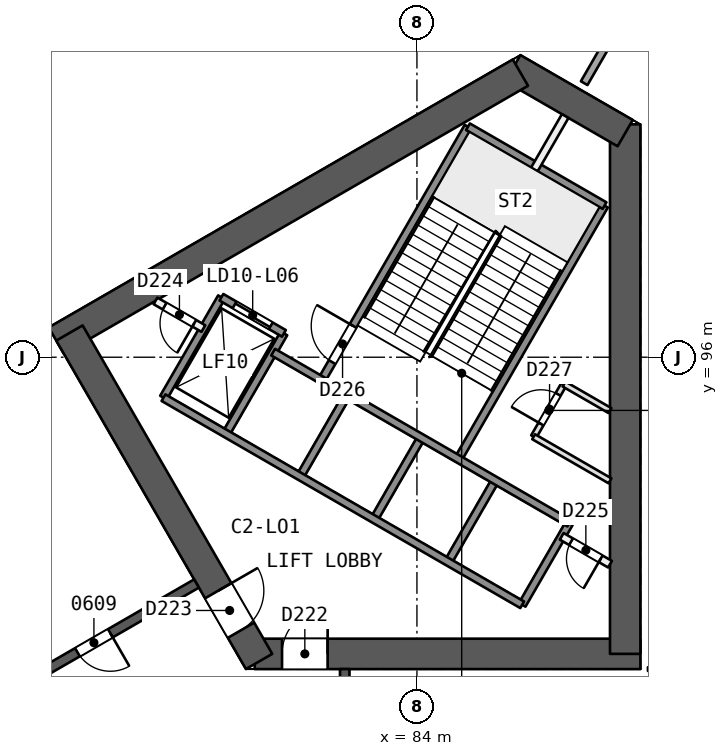
"""IFC4 building model, lengths in metres.
Left out: names, types, materials, properties, quantities, classifications, styles, units other than length and angle.
Written with IfcOpenShell. Run it as: python <this file> out.ifc"""

import sys

from ifc_helpers import new_model, si_unit, direction, frame, frame_2d, origin, place, context, subcontext, project, spatial, rectangle, extrude, element, fill, save


model = new_model("IFC4")
c1 = context("Model", 3, precision=1e-05, world=origin(), true_north=direction((0.0, 1.0)))
c2 = subcontext(c1, "Body", "Model", "MODEL_VIEW")
j1 = project(units=[si_unit("LENGTHUNIT", "METRE"), si_unit("PLANEANGLEUNIT", "RADIAN")], contexts=[c1])
p1 = place(None, origin())
s1 = spatial("IfcSite", under=j1, at=p1, CompositionType="ELEMENT")
p2 = place(p1, origin())
s2 = spatial("IfcBuilding", under=s1, at=p2, CompositionType="ELEMENT")
p3 = place(p2, frame((0.0, 0.0, 33.7)))
s3 = spatial("IfcBuildingStorey", under=s2, at=p3, CompositionType="ELEMENT", Elevation=33.7)
p4 = place(p3, frame((79.731, 88.194, 0.0), z_axis=(0.0, 0.0, 1.0), x_axis=(1.0, 0.0, 0.0)))
e1 = element("IfcWall", 1, at=p4, inside=s3, PredefinedType="SHEAR", context=c2, shape_type="SweptSolid", body=[
    extrude(rectangle(XDim=10.149, YDim=0.8, at=frame_2d((5.074, 0.0))), origin(), (0.0, 0.0, 1.0), 3.7),
])
p5 = place(p4, frame((0.719, 0.0, 0.0)))
e2 = element("IfcOpeningElement", 2, at=p5, cuts=e1, PredefinedType="OPENING", context=c2, shape_type="SweptSolid", body=[
    extrude(rectangle(XDim=1.2, YDim=2.1, at=frame_2d((0.6, 1.05))), frame((0.0, 0.411, 0.0), z_axis=(0.0, -1.0, 0.0), x_axis=(1.0, 0.0, 0.0)), (0.0, 0.0, 1.0), 0.821),
])
p6 = place(p3, frame((89.48, 88.194, 0.0), z_axis=(0.0, 0.0, 1.0), x_axis=(0.0, 1.0, 0.0)))
e3 = element("IfcWall", 3, at=p6, inside=s3, PredefinedType="SHEAR", context=c2, shape_type="SweptSolid", body=[
    extrude(rectangle(XDim=13.933, YDim=0.8, at=frame_2d((6.967, 0.0))), origin(), (0.0, 0.0, 1.0), 3.7),
])
p7 = place(p3, frame((89.48, 101.897, 0.0), z_axis=(0.0, 0.0, 1.0), x_axis=(-0.866034355626, 0.499984494636, 0.0)))
e4 = element("IfcWall", 4, at=p7, inside=s3, PredefinedType="SHEAR", context=c2, shape_type="SweptSolid", body=[
    extrude(rectangle(XDim=3.414, YDim=0.8, at=frame_2d((1.707, 0.0))), origin(), (0.0, 0.0, 1.0), 3.7),
])
p8 = place(p3, frame((86.723, 103.488, 0.0), z_axis=(0.0, 0.0, 1.0), x_axis=(-0.866032504327, -0.499987701298, 0.0)))
e5 = element("IfcWall", 5, at=p8, inside=s3, PredefinedType="SHEAR", context=c2, shape_type="SweptSolid", body=[
    extrude(rectangle(XDim=14.102, YDim=0.8, at=frame_2d((7.051, 0.0))), origin(), (0.0, 0.0, 1.0), 3.7),
])
p9 = place(p3, frame((74.856, 96.637, 0.0), z_axis=(0.0, 0.0, 1.0), x_axis=(0.499993500917, -0.866029155999, 0.0)))
e6 = element("IfcWall", 6, at=p9, inside=s3, PredefinedType="SHEAR", context=c2, shape_type="SweptSolid", body=[
    extrude(rectangle(XDim=9.98, YDim=0.8, at=frame_2d((4.99, 0.0))), origin(), (0.0, 0.0, 1.0), 3.7),
])
p10 = place(p9, frame((7.83, 0.0, 0.0)))
e7 = element("IfcOpeningElement", 7, at=p10, cuts=e6, PredefinedType="OPENING", context=c2, shape_type="SweptSolid", body=[
    extrude(rectangle(XDim=1.2, YDim=2.1, at=frame_2d((0.6, 1.05))), frame((0.0, 0.411, 0.0), z_axis=(0.0, -1.0, 0.0), x_axis=(1.0, 0.0, 0.0)), (0.0, 0.0, 1.0), 0.821),
])
p11 = place(p3, frame((82.1, 72.206, 0.0), z_axis=(0.0, 0.0, 1.0), x_axis=(0.0, 1.0, 0.0)))
e8 = element("IfcWall", 8, at=p11, inside=s3, PredefinedType="SHEAR", context=c2, shape_type="SweptSolid", body=[
    extrude(rectangle(XDim=15.588, YDim=0.25, at=frame_2d((7.794, 0.0))), origin(), (0.0, 0.0, 1.0), 3.2),
])
p12 = place(p11, frame((2.462, 0.0, 0.0)))
e9 = element("IfcOpeningElement", 9, at=p12, cuts=e8, PredefinedType="OPENING", context=c2, shape_type="SweptSolid", body=[
    extrude(rectangle(XDim=1.0, YDim=2.1, at=frame_2d((0.5, 1.05))), frame((0.0, 0.135, 0.0), z_axis=(0.0, -1.0, 0.0), x_axis=(1.0, 0.0, 0.0)), (0.0, 0.0, 1.0), 0.271),
])
p13 = place(p11, frame((8.315, 0.0, 0.0)))
e10 = element("IfcOpeningElement", 10, at=p13, cuts=e8, PredefinedType="OPENING", context=c2, shape_type="SweptSolid", body=[
    extrude(rectangle(XDim=1.1, YDim=2.1, at=frame_2d((0.55, 1.05))), frame((0.0, 0.135, 0.0), z_axis=(0.0, -1.0, 0.0), x_axis=(1.0, 0.0, 0.0)), (0.0, 0.0, 1.0), 0.271),
])
p14 = place(p11, frame((12.127, 0.0, 0.0)))
e11 = element("IfcOpeningElement", 11, at=p14, cuts=e8, PredefinedType="OPENING", context=c2, shape_type="SweptSolid", body=[
    extrude(rectangle(XDim=1.0, YDim=2.1, at=frame_2d((0.5, 1.05))), frame((0.0, 0.135, 0.0), z_axis=(0.0, -1.0, 0.0), x_axis=(1.0, 0.0, 0.0)), (0.0, 0.0, 1.0), 0.271),
])
p15 = place(p3, frame((78.2, 90.046, 0.0), z_axis=(0.0, 0.0, 1.0), x_axis=(-0.866026492143, -0.499998114903, 0.0)))
e12 = element("IfcWall", 12, at=p15, inside=s3, PredefinedType="SHEAR", context=c2, shape_type="SweptSolid", body=[
    extrude(rectangle(XDim=15.588, YDim=0.25, at=frame_2d((7.794, 0.0))), origin(), (0.0, 0.0, 1.0), 3.2),
])
p16 = place(p15, frame((2.618, 0.0, 0.0)))
e13 = element("IfcOpeningElement", 13, at=p16, cuts=e12, PredefinedType="OPENING", context=c2, shape_type="SweptSolid", body=[
    extrude(rectangle(XDim=1.0, YDim=2.1, at=frame_2d((0.5, 1.05))), frame((0.0, 0.135, 0.0), z_axis=(0.0, -1.0, 0.0), x_axis=(1.0, 0.0, 0.0)), (0.0, 0.0, 1.0), 0.271),
])
p17 = place(p15, frame((9.218, 0.0, 0.0)))
e14 = element("IfcOpeningElement", 14, at=p17, cuts=e12, PredefinedType="OPENING", context=c2, shape_type="SweptSolid", body=[
    extrude(rectangle(XDim=1.0, YDim=2.1, at=frame_2d((0.5, 1.05))), frame((0.0, 0.135, 0.0), z_axis=(0.0, -1.0, 0.0), x_axis=(1.0, 0.0, 0.0)), (0.0, 0.0, 1.0), 0.271),
])
p18 = place(p15, frame((12.594, 0.0, 0.0)))
e15 = element("IfcOpeningElement", 15, at=p18, cuts=e12, PredefinedType="OPENING", context=c2, shape_type="SweptSolid", body=[
    extrude(rectangle(XDim=1.0, YDim=2.1, at=frame_2d((0.5, 1.05))), frame((0.0, 0.135, 0.0), z_axis=(0.0, -1.0, 0.0), x_axis=(1.0, 0.0, 0.0)), (0.0, 0.0, 1.0), 0.271),
])
p19 = place(p3, frame((96.276, 87.794, 0.0), z_axis=(0.0, 0.0, 1.0), x_axis=(-1.0, 0.0, 0.0)))
e16 = element("IfcWall", 16, at=p19, inside=s3, PredefinedType="PARTITIONING", context=c2, shape_type="SweptSolid", body=[
    extrude(rectangle(XDim=6.197, YDim=0.1, at=frame_2d((3.099, 0.0))), origin(), (0.0, 0.0, 1.0), 3.2),
])
p20 = place(p19, frame((2.649, 0.0, 0.0)))
e17 = element("IfcOpeningElement", 17, at=p20, cuts=e16, PredefinedType="OPENING", context=c2, shape_type="SweptSolid", body=[
    extrude(rectangle(XDim=0.9, YDim=2.1, at=frame_2d((0.45, 1.05))), frame((0.0, 0.061, 0.0), z_axis=(0.0, -1.0, 0.0), x_axis=(1.0, 0.0, 0.0)), (0.0, 0.0, 1.0), 0.121),
])
p21 = place(p3, frame((93.621, 112.252, 0.0), z_axis=(0.0, 0.0, 1.0), x_axis=(-0.499992367345, -0.866029810455, 0.0)))
e18 = element("IfcWall", 18, at=p21, inside=s3, PredefinedType="PARTITIONING", context=c2, shape_type="SweptSolid", body=[
    extrude(rectangle(XDim=10.44, YDim=0.2, at=frame_2d((5.22, 0.0))), origin(), (0.0, 0.0, 1.0), 3.2),
])
p22 = place(p3, frame((37.61, 83.152, 0.0), z_axis=(0.0, 0.0, 1.0), x_axis=(0.866024438126, 0.500001672566, 0.0)))
e19 = element("IfcWall", 19, at=p22, inside=s3, PredefinedType="SOLIDWALL", context=c2, shape_type="SweptSolid", body=[
    extrude(rectangle(XDim=61.61, YDim=0.3, at=frame_2d((30.805, 0.0))), origin(), (0.0, 0.0, 1.0), 3.2),
])
p23 = place(p22, frame((34.281, 0.0, 0.0)))
e20 = element("IfcOpeningElement", 20, at=p23, cuts=e19, PredefinedType="OPENING", context=c2, shape_type="SweptSolid", body=[
    extrude(rectangle(XDim=2.4, YDim=2.4, at=frame_2d((1.2, 1.2))), frame((0.0, 0.161, 0.0), z_axis=(0.0, -1.0, 0.0), x_axis=(1.0, 0.0, 0.0)), (0.0, 0.0, 1.0), 0.321),
])
p24 = place(p22, frame((47.767, 0.0, 0.0)))
e21 = element("IfcOpeningElement", 21, at=p24, cuts=e19, PredefinedType="OPENING", context=c2, shape_type="SweptSolid", body=[
    extrude(rectangle(XDim=2.4, YDim=2.4, at=frame_2d((1.2, 1.2))), frame((0.0, 0.161, 0.0), z_axis=(0.0, -1.0, 0.0), x_axis=(1.0, 0.0, 0.0)), (0.0, 0.0, 1.0), 0.321),
])
p25 = place(p22, frame((24.305, 0.0, 0.0)))
e22 = element("IfcOpeningElement", 22, at=p25, cuts=e19, PredefinedType="OPENING", context=c2, shape_type="SweptSolid", body=[
    extrude(rectangle(XDim=2.4, YDim=2.4, at=frame_2d((1.2, 1.2))), frame((0.0, 0.161, 0.0), z_axis=(0.0, -1.0, 0.0), x_axis=(1.0, 0.0, 0.0)), (0.0, 0.0, 1.0), 0.321),
])
p26 = place(p22, frame((11.402, 0.0, 0.0)))
e23 = element("IfcOpeningElement", 23, at=p26, cuts=e19, PredefinedType="OPENING", context=c2, shape_type="SweptSolid", body=[
    extrude(rectangle(XDim=2.4, YDim=2.4, at=frame_2d((1.2, 1.2))), frame((0.0, 0.161, 0.0), z_axis=(0.0, -1.0, 0.0), x_axis=(1.0, 0.0, 0.0)), (0.0, 0.0, 1.0), 0.321),
])
p27 = place(p22, frame((28.981, 0.0, 0.0)))
e24 = element("IfcOpeningElement", 24, at=p27, cuts=e19, PredefinedType="OPENING", context=c2, shape_type="SweptSolid", body=[
    extrude(rectangle(XDim=2.4, YDim=2.4, at=frame_2d((1.2, 1.2))), frame((0.0, 0.161, 0.0), z_axis=(0.0, -1.0, 0.0), x_axis=(1.0, 0.0, 0.0)), (0.0, 0.0, 1.0), 0.321),
])
p28 = place(p3, frame((86.77, 89.486, 0.0), z_axis=(0.0, 0.0, 1.0), x_axis=(0.499961042966, 0.86604789447, 0.0)))
e25 = element("IfcWall", 25, at=p28, inside=s3, PredefinedType="SOLIDWALL", context=c2, shape_type="SweptSolid", body=[
    extrude(rectangle(XDim=2.48, YDim=0.2, at=frame_2d((1.24, 0.0))), origin(), (0.0, 0.0, 1.0), 3.2),
])
p29 = place(p3, frame((87.071, 93.908, 0.0), z_axis=(0.0, 0.0, 1.0), x_axis=(0.499995408039, 0.866028054938, 0.0)))
e26 = element("IfcWall", 26, at=p29, inside=s3, PredefinedType="PARTITIONING", context=c2, shape_type="SweptSolid", body=[
    extrude(rectangle(XDim=1.6, YDim=0.15, at=frame_2d((0.8, 0.0))), origin(), (0.0, 0.0, 1.0), 3.2),
])
p30 = place(p29, frame((0.387, 0.0, 0.0)))
e27 = element("IfcOpeningElement", 27, at=p30, cuts=e26, PredefinedType="OPENING", context=c2, shape_type="SweptSolid", body=[
    extrude(rectangle(XDim=0.9, YDim=2.1, at=frame_2d((0.45, 1.05))), frame((0.0, 0.085, 0.0), z_axis=(0.0, -1.0, 0.0), x_axis=(1.0, 0.0, 0.0)), (0.0, 0.0, 1.0), 0.171),
])
p31 = place(p3, frame((84.821, 90.611, 0.0), z_axis=(0.0, 0.0, 1.0), x_axis=(0.499961042966, 0.86604789447, 0.0)))
e28 = element("IfcWall", 28, at=p31, inside=s3, PredefinedType="SOLIDWALL", context=c2, shape_type="SweptSolid", body=[
    extrude(rectangle(XDim=2.48, YDim=0.2, at=frame_2d((1.24, 0.0))), origin(), (0.0, 0.0, 1.0), 3.2),
])
p32 = place(p3, frame((85.087, 93.321, 0.0), z_axis=(0.0, 0.0, 1.0), x_axis=(0.500019787375, 0.866013979237, 0.0)))
e29 = element("IfcWall", 29, at=p32, inside=s3, PredefinedType="SOLIDWALL", context=c2, shape_type="SweptSolid", body=[
    extrude(rectangle(XDim=7.7, YDim=0.2, at=frame_2d((3.85, 0.0))), origin(), (0.0, 0.0, 1.0), 3.2),
])
p33 = place(p3, frame((82.873, 91.736, 0.0), z_axis=(0.0, 0.0, 1.0), x_axis=(0.499961042966, 0.86604789447, 0.0)))
e30 = element("IfcWall", 30, at=p33, inside=s3, PredefinedType="SOLIDWALL", context=c2, shape_type="SweptSolid", body=[
    extrude(rectangle(XDim=2.48, YDim=0.2, at=frame_2d((1.24, 0.0))), origin(), (0.0, 0.0, 1.0), 3.2),
])
p34 = place(p3, frame((87.09, 100.94, 0.0), z_axis=(0.0, 0.0, 1.0), x_axis=(0.499956811548, 0.866050337213, 0.0)))
e31 = element("IfcWall", 31, at=p34, inside=s3, PredefinedType="PARTITIONING", context=c2, shape_type="SweptSolid", body=[
    extrude(rectangle(XDim=1.623, YDim=0.2, at=frame_2d((0.812, 0.0))), origin(), (0.0, 0.0, 1.0), 3.2),
])
p35 = place(p3, frame((80.924, 92.861, 0.0), z_axis=(0.0, 0.0, 1.0), x_axis=(0.499961042966, 0.86604789447, 0.0)))
e32 = element("IfcWall", 32, at=p35, inside=s3, PredefinedType="SOLIDWALL", context=c2, shape_type="SweptSolid", body=[
    extrude(rectangle(XDim=2.48, YDim=0.2, at=frame_2d((1.24, 0.0))), origin(), (0.0, 0.0, 1.0), 3.2),
])
p36 = place(p3, frame((81.493, 95.396, 0.0), z_axis=(0.0, 0.0, 1.0), x_axis=(0.500006057782, 0.866021906294, 0.0)))
e33 = element("IfcWall", 33, at=p36, inside=s3, PredefinedType="SOLIDWALL", context=c2, shape_type="SweptSolid", body=[
    extrude(rectangle(XDim=7.7, YDim=0.2, at=frame_2d((3.85, 0.0))), origin(), (0.0, 0.0, 1.0), 3.2),
])
p37 = place(p36, frame((0.55, 0.0, 0.0)))
e34 = element("IfcOpeningElement", 34, at=p37, cuts=e33, PredefinedType="OPENING", context=c2, shape_type="SweptSolid", body=[
    extrude(rectangle(XDim=1.1, YDim=2.1, at=frame_2d((0.55, 1.05))), frame((0.0, 0.11, 0.0), z_axis=(0.0, -1.0, 0.0), x_axis=(1.0, 0.0, 0.0)), (0.0, 0.0, 1.0), 0.221),
])
for number, where, z_axis, x_axis in (
    (35, (78.976, 93.986, 0.0), (0.0, 0.0, 1.0), (0.5, 0.866, 0.0)),
    (36, (77.33, 94.936, 0.0), (0.0, 0.0, 1.0), (0.5, 0.866, 0.0)),
):
    element("IfcWall", number, at=place(p3, frame(where, z_axis=z_axis, x_axis=x_axis)), inside=s3, PredefinedType="SOLIDWALL", context=c2, shape_type="SweptSolid", body=[
        extrude(rectangle(XDim=3.05, YDim=0.2, at=frame_2d((1.525, 0.0))), origin(), (0.0, 0.0, 1.0), 3.2),
    ])
p38 = place(p3, frame((86.77, 89.486, 0.0), z_axis=(0.0, 0.0, 1.0), x_axis=(-0.86601811187, 0.500012629753, 0.0)))
e37 = element("IfcWall", 37, at=p38, inside=s3, PredefinedType="SOLIDWALL", context=c2, shape_type="SweptSolid", body=[
    extrude(rectangle(XDim=10.9, YDim=0.2, at=frame_2d((5.45, 0.0))), origin(), (0.0, 0.0, 1.0), 3.2),
])
p39 = place(p3, frame((89.08, 90.554, 0.0), z_axis=(0.0, 0.0, 1.0), x_axis=(-0.866022048785, 0.500005810984, 0.0)))
e38 = element("IfcWall", 38, at=p39, inside=s3, PredefinedType="PARTITIONING", context=c2, shape_type="SweptSolid", body=[
    extrude(rectangle(XDim=1.467, YDim=0.2, at=frame_2d((0.733, 0.0))), origin(), (0.0, 0.0, 1.0), 3.2),
])
p40 = place(p39, frame((0.283, 0.0, 0.0)))
e39 = element("IfcOpeningElement", 39, at=p40, cuts=e38, PredefinedType="OPENING", context=c2, shape_type="SweptSolid", body=[
    extrude(rectangle(XDim=0.9, YDim=2.1, at=frame_2d((0.45, 1.05))), frame((0.0, 0.11, 0.0), z_axis=(0.0, -1.0, 0.0), x_axis=(1.0, 0.0, 0.0)), (0.0, 0.0, 1.0), 0.221),
])
p41 = place(p3, frame((78.38, 96.755, 0.0), z_axis=(0.0, 0.0, 1.0), x_axis=(-0.866003949776, 0.500037157592, 0.0)))
e40 = element("IfcWall", 40, at=p41, inside=s3, PredefinedType="PARTITIONING", context=c2, shape_type="SweptSolid", body=[
    extrude(rectangle(XDim=1.455, YDim=0.2, at=frame_2d((0.728, 0.0))), origin(), (0.0, 0.0, 1.0), 3.2),
])
p42 = place(p41, frame((0.278, 0.0, 0.0)))
e41 = element("IfcOpeningElement", 41, at=p42, cuts=e40, PredefinedType="OPENING", context=c2, shape_type="SweptSolid", body=[
    extrude(rectangle(XDim=0.9, YDim=2.1, at=frame_2d((0.45, 1.05))), frame((0.0, 0.11, 0.0), z_axis=(0.0, -1.0, 0.0), x_axis=(1.0, 0.0, 0.0)), (0.0, 0.0, 1.0), 0.221),
])
p43 = place(p3, frame((88.01, 91.634, 0.0), z_axis=(0.0, 0.0, 1.0), x_axis=(-0.866024315419, 0.5000018851, 0.0)))
e42 = element("IfcWall", 42, at=p43, inside=s3, PredefinedType="SOLIDWALL", context=c2, shape_type="SweptSolid", body=[
    extrude(rectangle(XDim=9.0, YDim=0.2, at=frame_2d((4.5, 0.0))), origin(), (0.0, 0.0, 1.0), 3.2),
])
p44 = place(p3, frame((80.5, 96.627, 0.0), z_axis=(0.0, 0.0, 1.0), x_axis=(-0.86601224135, 0.500022797313, 0.0)))
e43 = element("IfcWall", 43, at=p44, inside=s3, PredefinedType="SOLIDWALL", context=c2, shape_type="SweptSolid", body=[
    extrude(rectangle(XDim=1.9, YDim=0.2, at=frame_2d((0.95, 0.0))), origin(), (0.0, 0.0, 1.0), 3.2),
])
p45 = place(p44, frame((0.4, 0.0, 0.0)))
e44 = element("IfcOpeningElement", 44, at=p45, cuts=e43, PredefinedType="OPENING", context=c2, shape_type="SweptSolid", body=[
    extrude(rectangle(XDim=1.1, YDim=2.1, at=frame_2d((0.55, 1.05))), frame((0.0, 0.11, 0.0), z_axis=(0.0, -1.0, 0.0), x_axis=(1.0, 0.0, 0.0)), (0.0, 0.0, 1.0), 0.221),
])
p46 = place(p3, frame((89.08, 92.748, 0.0), z_axis=(0.0, 0.0, 1.0), x_axis=(-0.866026103983, 0.499998787219, 0.0)))
e45 = element("IfcWall", 45, at=p46, inside=s3, PredefinedType="PARTITIONING", context=c2, shape_type="SweptSolid", body=[
    extrude(rectangle(XDim=2.32, YDim=0.15, at=frame_2d((1.16, 0.0))), origin(), (0.0, 0.0, 1.0), 3.2),
])
p47 = place(p3, frame((89.08, 94.595, 0.0), z_axis=(0.0, 0.0, 1.0), x_axis=(-0.866028321769, 0.499994945868, 0.0)))
e46 = element("IfcWall", 46, at=p47, inside=s3, PredefinedType="PARTITIONING", context=c2, shape_type="SweptSolid", body=[
    extrude(rectangle(XDim=1.396, YDim=0.15, at=frame_2d((0.698, 0.0))), origin(), (0.0, 0.0, 1.0), 3.2),
])
p48 = place(p3, frame((88.937, 99.99, 0.0), z_axis=(0.0, 0.0, 1.0), x_axis=(-0.866004344652, 0.500036473714, 0.0)))
e47 = element("IfcWall", 47, at=p48, inside=s3, PredefinedType="SOLIDWALL", context=c2, shape_type="SweptSolid", body=[
    extrude(rectangle(XDim=4.15, YDim=0.2, at=frame_2d((2.075, 0.0))), origin(), (0.0, 0.0, 1.0), 3.2),
])
p49 = place(p16, origin())
e48 = element("IfcDoor", 48, at=p49, inside=s3, OperationType="SINGLE_SWING_LEFT", PredefinedType="NOTDEFINED", context=c2, shape_type="SweptSolid", body=[
    extrude(rectangle(XDim=1.0, YDim=2.1, at=frame_2d((0.5, 1.05))), frame((0.0, 0.025, 0.0), z_axis=(0.0, -1.0, 0.0), x_axis=(1.0, 0.0, 0.0)), (0.0, 0.0, 1.0), 0.05),
])
fill(e13, e48)
p50 = place(p5, origin())
e49 = element("IfcDoor", 49, at=p50, inside=s3, OperationType="SINGLE_SWING_RIGHT", PredefinedType="NOTDEFINED", context=c2, shape_type="SweptSolid", body=[
    extrude(rectangle(XDim=1.2, YDim=2.1, at=frame_2d((0.6, 1.05))), frame((0.0, 0.025, 0.0), z_axis=(0.0, -1.0, 0.0), x_axis=(1.0, 0.0, 0.0)), (0.0, 0.0, 1.0), 0.05),
])
fill(e2, e49)
p51 = place(p10, origin())
e50 = element("IfcDoor", 50, at=p51, inside=s3, OperationType="SINGLE_SWING_LEFT", PredefinedType="NOTDEFINED", context=c2, shape_type="SweptSolid", body=[
    extrude(rectangle(XDim=1.2, YDim=2.1, at=frame_2d((0.6, 1.05))), frame((0.0, 0.025, 0.0), z_axis=(0.0, -1.0, 0.0), x_axis=(1.0, 0.0, 0.0)), (0.0, 0.0, 1.0), 0.05),
])
fill(e7, e50)
p52 = place(p45, origin())
e51 = element("IfcDoor", 51, at=p52, inside=s3, OperationType="SLIDING_TO_RIGHT", PredefinedType="NOTDEFINED", context=c2, shape_type="SweptSolid", body=[
    extrude(rectangle(XDim=1.1, YDim=2.1, at=frame_2d((0.55, 1.05))), frame((0.0, 0.025, 0.0), z_axis=(0.0, -1.0, 0.0), x_axis=(1.0, 0.0, 0.0)), (0.0, 0.0, 1.0), 0.05),
])
fill(e44, e51)
p53 = place(p42, origin())
e52 = element("IfcDoor", 52, at=p53, inside=s3, OperationType="SINGLE_SWING_LEFT", PredefinedType="NOTDEFINED", context=c2, shape_type="SweptSolid", body=[
    extrude(rectangle(XDim=0.9, YDim=2.1, at=frame_2d((0.45, 1.05))), frame((0.0, 0.025, 0.0), z_axis=(0.0, -1.0, 0.0), x_axis=(1.0, 0.0, 0.0)), (0.0, 0.0, 1.0), 0.05),
])
fill(e41, e52)
p54 = place(p40, origin())
e53 = element("IfcDoor", 53, at=p54, inside=s3, OperationType="SINGLE_SWING_LEFT", PredefinedType="NOTDEFINED", context=c2, shape_type="SweptSolid", body=[
    extrude(rectangle(XDim=0.9, YDim=2.1, at=frame_2d((0.45, 1.05))), frame((0.0, 0.025, 0.0), z_axis=(0.0, -1.0, 0.0), x_axis=(1.0, 0.0, 0.0)), (0.0, 0.0, 1.0), 0.05),
])
fill(e39, e53)
p55 = place(p37, origin())
e54 = element("IfcDoor", 54, at=p55, inside=s3, OperationType="SINGLE_SWING_RIGHT", PredefinedType="NOTDEFINED", context=c2, shape_type="SweptSolid", body=[
    extrude(rectangle(XDim=1.1, YDim=2.1, at=frame_2d((0.55, 1.05))), frame((0.0, 0.025, 0.0), z_axis=(0.0, -1.0, 0.0), x_axis=(1.0, 0.0, 0.0)), (0.0, 0.0, 1.0), 0.05),
])
fill(e34, e54)
p56 = place(p30, origin())
e55 = element("IfcDoor", 55, at=p56, inside=s3, OperationType="SINGLE_SWING_LEFT", PredefinedType="NOTDEFINED", context=c2, shape_type="SweptSolid", body=[
    extrude(rectangle(XDim=0.9, YDim=2.1, at=frame_2d((0.45, 1.05))), frame((0.0, 0.025, 0.0), z_axis=(0.0, -1.0, 0.0), x_axis=(1.0, 0.0, 0.0)), (0.0, 0.0, 1.0), 0.05),
])
fill(e27, e55)
save(model, sys.argv[1])
